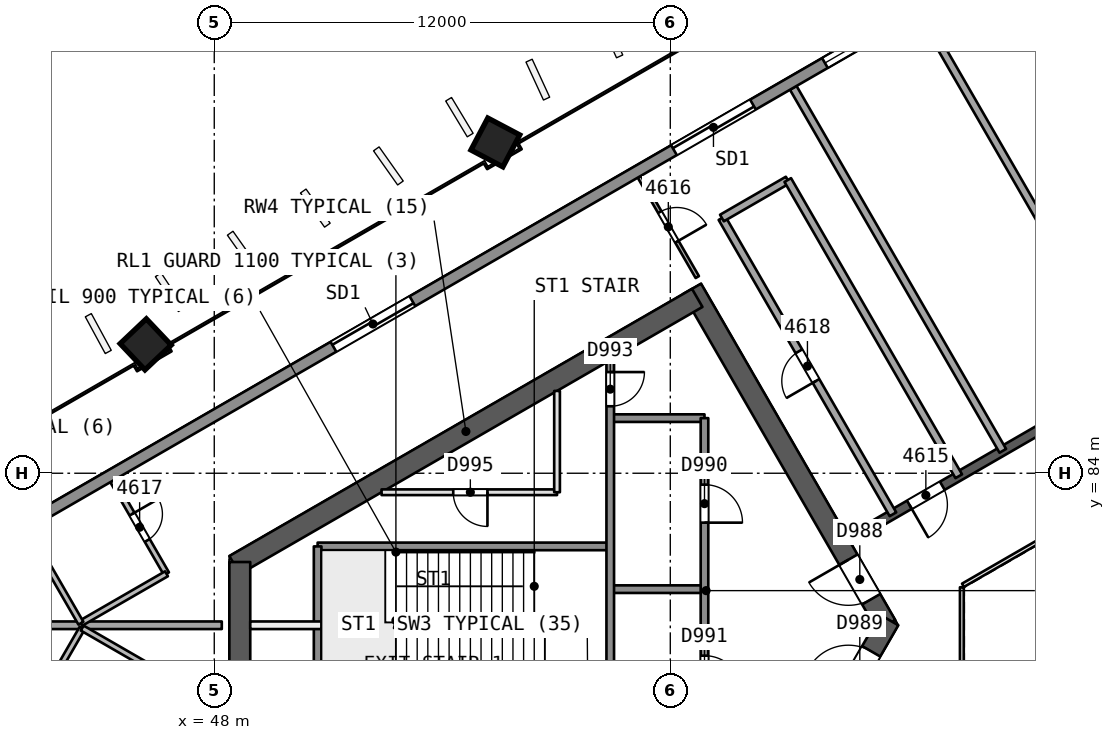
"""IFC4 building model, lengths in metres.
Left out: names, types, materials, properties, quantities, classifications, styles, units other than length and angle.
Written with IfcOpenShell. Run it as: python <this file> out.ifc"""

import sys

from ifc_helpers import new_model, si_unit, direction, frame, frame_2d, origin, origin_2d, place, context, subcontext, project, spatial, rectangle, extrude, element, fill, save


model = new_model("IFC4")
c1 = context("Model", 3, precision=1e-05, world=origin(), true_north=direction((0.0, 1.0)))
c2 = subcontext(c1, "Body", "Model", "MODEL_VIEW")
j1 = project(units=[si_unit("LENGTHUNIT", "METRE"), si_unit("PLANEANGLEUNIT", "RADIAN")], contexts=[c1])
p1 = place(None, origin())
s1 = spatial("IfcSite", under=j1, at=p1, CompositionType="ELEMENT")
p2 = place(p1, origin())
s2 = spatial("IfcBuilding", under=s1, at=p2, CompositionType="ELEMENT")
p3 = place(p2, frame((0.0, 0.0, 189.6)))
s3 = spatial("IfcBuildingStorey", under=s2, at=p3, CompositionType="ELEMENT", Elevation=189.6)
p4 = place(p3, frame((65.682, 80.0, 0.0), z_axis=(0.0, 0.0, 1.0), x_axis=(-0.500000202252, 0.866025287014, 0.0)))
e1 = element("IfcWall", 1, at=p4, inside=s3, PredefinedType="SHEAR", context=c2, shape_type="SweptSolid", body=[
    extrude(rectangle(XDim=10.221, YDim=0.55, at=frame_2d((5.111, 0.0))), origin(), (0.0, 0.0, 1.0), 3.7),
])
p5 = place(p4, frame((0.791, 0.0, 0.0)))
e2 = element("IfcOpeningElement", 2, at=p5, cuts=e1, PredefinedType="OPENING", context=c2, shape_type="SweptSolid", body=[
    extrude(rectangle(XDim=1.2, YDim=2.1, at=frame_2d((0.6, 1.05))), frame((0.0, 0.286, 0.0), z_axis=(0.0, -1.0, 0.0), x_axis=(1.0, 0.0, 0.0)), (0.0, 0.0, 1.0), 0.571),
])
p6 = place(p3, frame((60.709, 88.614, 0.0), z_axis=(0.0, 0.0, 1.0), x_axis=(-0.866020164116, -0.500009075263, 0.0)))
e3 = element("IfcWall", 3, at=p6, inside=s3, PredefinedType="SHEAR", context=c2, shape_type="SweptSolid", body=[
    extrude(rectangle(XDim=14.058, YDim=0.55, at=frame_2d((7.029, 0.0))), origin(), (0.0, 0.0, 1.0), 3.7),
])
p7 = place(p3, frame((48.672, 81.664, 0.0), z_axis=(0.0, 0.0, 1.0), x_axis=(0.0, -1.0, 0.0)))
e4 = element("IfcWall", 4, at=p7, inside=s3, PredefinedType="SHEAR", context=c2, shape_type="SweptSolid", body=[
    extrude(rectangle(XDim=3.487, YDim=0.55, at=frame_2d((1.743, 0.0))), origin(), (0.0, 0.0, 1.0), 3.7),
])
p8 = place(p3, frame((60.709, 71.386, 0.0), z_axis=(0.0, 0.0, 1.0), x_axis=(0.500015938302, 0.866016201606, 0.0)))
e5 = element("IfcWall", 5, at=p8, inside=s3, PredefinedType="SHEAR", context=c2, shape_type="SweptSolid", body=[
    extrude(rectangle(XDim=10.105, YDim=0.55, at=frame_2d((5.053, 0.0))), origin(), (0.0, 0.0, 1.0), 3.7),
])
p9 = place(p8, frame((7.955, 0.0, 0.0)))
e6 = element("IfcOpeningElement", 6, at=p9, cuts=e5, PredefinedType="OPENING", context=c2, shape_type="SweptSolid", body=[
    extrude(rectangle(XDim=1.2, YDim=2.1, at=frame_2d((0.6, 1.05))), frame((0.0, 0.286, 0.0), z_axis=(0.0, -1.0, 0.0), x_axis=(1.0, 0.0, 0.0)), (0.0, 0.0, 1.0), 0.571),
])
p10 = place(p3, frame((78.2, 90.046, 0.0), z_axis=(0.0, 0.0, 1.0), x_axis=(-0.866026492143, -0.499998114903, 0.0)))
e7 = element("IfcWall", 7, at=p10, inside=s3, PredefinedType="SHEAR", context=c2, shape_type="SweptSolid", body=[
    extrude(rectangle(XDim=15.588, YDim=0.25, at=frame_2d((7.794, 0.0))), origin(), (0.0, 0.0, 1.0), 3.25),
])
p11 = place(p10, frame((1.059, 0.0, 0.0)))
e8 = element("IfcOpeningElement", 8, at=p11, cuts=e7, PredefinedType="OPENING", context=c2, shape_type="SweptSolid", body=[
    extrude(rectangle(XDim=1.0, YDim=2.1, at=frame_2d((0.5, 1.05))), frame((0.0, 0.135, 0.0), z_axis=(0.0, -1.0, 0.0), x_axis=(1.0, 0.0, 0.0)), (0.0, 0.0, 1.0), 0.271),
])
p12 = place(p10, frame((4.616, 0.0, 0.0)))
e9 = element("IfcOpeningElement", 9, at=p12, cuts=e7, PredefinedType="OPENING", context=c2, shape_type="SweptSolid", body=[
    extrude(rectangle(XDim=0.9, YDim=2.1, at=frame_2d((0.45, 1.05))), frame((0.0, 0.135, 0.0), z_axis=(0.0, -1.0, 0.0), x_axis=(1.0, 0.0, 0.0)), (0.0, 0.0, 1.0), 0.271),
])
p13 = place(p10, frame((8.513, 0.0, 0.0)))
e10 = element("IfcOpeningElement", 10, at=p13, cuts=e7, PredefinedType="OPENING", context=c2, shape_type="SweptSolid", body=[
    extrude(rectangle(XDim=0.9, YDim=2.1, at=frame_2d((0.45, 1.05))), frame((0.0, 0.135, 0.0), z_axis=(0.0, -1.0, 0.0), x_axis=(1.0, 0.0, 0.0)), (0.0, 0.0, 1.0), 0.271),
])
p14 = place(p10, frame((12.75, 0.0, 0.0)))
e11 = element("IfcOpeningElement", 11, at=p14, cuts=e7, PredefinedType="OPENING", context=c2, shape_type="SweptSolid", body=[
    extrude(rectangle(XDim=1.0, YDim=2.1, at=frame_2d((0.5, 1.05))), frame((0.0, 0.135, 0.0), z_axis=(0.0, -1.0, 0.0), x_axis=(1.0, 0.0, 0.0)), (0.0, 0.0, 1.0), 0.271),
])
p15 = place(p3, frame((55.373, 92.719, 0.0), z_axis=(0.019328516974, -0.012138044789, 0.999739504221), x_axis=(-0.500205614953, 0.865671455024, 0.020181048691)))
e12 = element("IfcColumn", 12, at=p15, inside=s3, PredefinedType="COLUMN", context=c2, shape_type="SweptSolid", body=[
    extrude(rectangle(XDim=0.95, YDim=0.95, at=origin_2d()), origin(), (0.0, 0.0, 1.0), 3.701),
])
p16 = place(p3, frame((46.161, 87.399, 0.0), z_axis=(0.02855911485, -0.006793507689, 0.999569019734), x_axis=(-0.500407643461, 0.865554709988, 0.020180049142)))
e13 = element("IfcColumn", 13, at=p16, inside=s3, PredefinedType="COLUMN", context=c2, shape_type="SweptSolid", body=[
    extrude(rectangle(XDim=0.95, YDim=0.95, at=origin_2d()), origin(), (0.0, 0.0, 1.0), 3.702),
])
for number, where, z_axis, x_axis in (
    (14, (66.611, 96.09, 0.0), (0.0, 0.0, 1.0), (0.5, -0.866, 0.0)),
    (15, (63.236, 94.141, 0.0), (0.0, 0.0, 1.0), (0.5, -0.866, 0.0)),
):
    element("IfcWall", number, at=place(p3, frame(where, z_axis=z_axis, x_axis=x_axis)), inside=s3, PredefinedType="PARTITIONING", context=c2, shape_type="SweptSolid", body=[
        extrude(rectangle(XDim=11.029, YDim=0.2, at=frame_2d((5.514, 0.0))), origin(), (0.0, 0.0, 1.0), 3.25),
    ])
p17 = place(p3, frame((59.186, 91.803, 0.0), z_axis=(0.0, 0.0, 1.0), x_axis=(0.499978833458, -0.866037623948, 0.0)))
e16 = element("IfcWall", 16, at=p17, inside=s3, PredefinedType="PARTITIONING", context=c2, shape_type="SweptSolid", body=[
    extrude(rectangle(XDim=3.05, YDim=0.1, at=frame_2d((1.525, 0.0))), origin(), (0.0, 0.0, 1.0), 3.25),
])
p18 = place(p17, frame((1.075, 0.0, 0.0)))
e17 = element("IfcOpeningElement", 17, at=p18, cuts=e16, PredefinedType="OPENING", context=c2, shape_type="SweptSolid", body=[
    extrude(rectangle(XDim=0.9, YDim=2.1, at=frame_2d((0.45, 1.05))), frame((0.0, 0.061, 0.0), z_axis=(0.0, -1.0, 0.0), x_axis=(1.0, 0.0, 0.0)), (0.0, 0.0, 1.0), 0.121),
])
p19 = place(p3, frame((65.859, 82.921, 0.0), z_axis=(0.0, 0.0, 1.0), x_axis=(-0.5000018851, 0.866024315419, 0.0)))
e18 = element("IfcWall", 18, at=p19, inside=s3, PredefinedType="PARTITIONING", context=c2, shape_type="SweptSolid", body=[
    extrude(rectangle(XDim=9.0, YDim=0.2, at=frame_2d((4.5, 0.0))), origin(), (0.0, 0.0, 1.0), 3.25),
])
p20 = place(p19, frame((4.05, 0.0, 0.0)))
e19 = element("IfcOpeningElement", 19, at=p20, cuts=e18, PredefinedType="OPENING", context=c2, shape_type="SweptSolid", body=[
    extrude(rectangle(XDim=0.9, YDim=2.1, at=frame_2d((0.45, 1.05))), frame((0.0, 0.11, 0.0), z_axis=(0.0, -1.0, 0.0), x_axis=(1.0, 0.0, 0.0)), (0.0, 0.0, 1.0), 0.221),
])
p21 = place(p3, frame((61.359, 90.715, 0.0), z_axis=(0.0, 0.0, 1.0), x_axis=(0.866041268327, 0.499972520799, 0.0)))
e20 = element("IfcWall", 20, at=p21, inside=s3, PredefinedType="PARTITIONING", context=c2, shape_type="SweptSolid", body=[
    extrude(rectangle(XDim=2.0, YDim=0.2, at=frame_2d((1.0, 0.0))), origin(), (0.0, 0.0, 1.0), 3.25),
])
p22 = place(p3, frame((63.091, 91.715, 0.0), z_axis=(0.0, 0.0, 1.0), x_axis=(0.5000018851, -0.866024315419, 0.0)))
e21 = element("IfcWall", 21, at=p22, inside=s3, PredefinedType="PARTITIONING", context=c2, shape_type="SweptSolid", body=[
    extrude(rectangle(XDim=9.0, YDim=0.2, at=frame_2d((4.5, 0.0))), origin(), (0.0, 0.0, 1.0), 3.25),
])
p23 = place(p3, frame((45.329, 83.803, 0.0), z_axis=(0.0, 0.0, 1.0), x_axis=(0.500048839472, -0.865997204466, 0.0)))
e22 = element("IfcWall", 22, at=p23, inside=s3, PredefinedType="PARTITIONING", context=c2, shape_type="SweptSolid", body=[
    extrude(rectangle(XDim=2.827, YDim=0.15, at=frame_2d((1.414, 0.0))), origin(), (0.0, 0.0, 1.0), 3.25),
])
p24 = place(p23, frame((1.014, 0.0, 0.0)))
e23 = element("IfcOpeningElement", 23, at=p24, cuts=e22, PredefinedType="OPENING", context=c2, shape_type="SweptSolid", body=[
    extrude(rectangle(XDim=0.8, YDim=2.1, at=frame_2d((0.4, 1.05))), frame((0.0, 0.085, 0.0), z_axis=(0.0, -1.0, 0.0), x_axis=(1.0, 0.0, 0.0)), (0.0, 0.0, 1.0), 0.171),
])
p25 = place(p3, frame((46.743, 81.354, 0.0), z_axis=(0.0, 0.0, 1.0), x_axis=(-0.866021400173, -0.500006934395, 0.0)))
e24 = element("IfcWall", 24, at=p25, inside=s3, PredefinedType="PARTITIONING", context=c2, shape_type="SweptSolid", body=[
    extrude(rectangle(XDim=2.6, YDim=0.15, at=frame_2d((1.3, 0.0))), origin(), (0.0, 0.0, 1.0), 3.25),
])
p26 = place(p3, frame((44.491, 80.054, 0.0), z_axis=(0.0, 0.0, 1.0), x_axis=(-0.500043204492, 0.866000458222, 0.0)))
e25 = element("IfcWall", 25, at=p26, inside=s3, PredefinedType="PARTITIONING", context=c2, shape_type="SweptSolid", body=[
    extrude(rectangle(XDim=2.482, YDim=0.15, at=frame_2d((1.241, 0.0))), origin(), (0.0, 0.0, 1.0), 3.25),
])
p27 = place(p3, frame((43.25, 80.0, 0.0), z_axis=(0.0, 0.0, 1.0), x_axis=(1.0, 0.0, 0.0)))
e26 = element("IfcWall", 26, at=p27, inside=s3, PredefinedType="PARTITIONING", context=c2, shape_type="SweptSolid", body=[
    extrude(rectangle(XDim=4.948, YDim=0.2, at=frame_2d((2.474, 0.0))), origin(), (0.0, 0.0, 1.0), 3.25),
])
p28 = place(p3, frame((43.25, 77.718, 0.0), z_axis=(0.0, 0.0, 1.0), x_axis=(0.499990435942, 0.866030925526, 0.0)))
e27 = element("IfcWall", 27, at=p28, inside=s3, PredefinedType="PARTITIONING", context=c2, shape_type="SweptSolid", body=[
    extrude(rectangle(XDim=2.55, YDim=0.15, at=frame_2d((1.275, 0.0))), origin(), (0.0, 0.0, 1.0), 3.25),
])
p29 = place(p3, frame((44.525, 79.926, 0.0), z_axis=(0.0, 0.0, 1.0), x_axis=(0.866021400173, -0.500006934395, 0.0)))
e28 = element("IfcWall", 28, at=p29, inside=s3, PredefinedType="PARTITIONING", context=c2, shape_type="SweptSolid", body=[
    extrude(rectangle(XDim=2.6, YDim=0.15, at=frame_2d((1.3, 0.0))), origin(), (0.0, 0.0, 1.0), 3.25),
])
p30 = place(p3, frame((43.101, 82.689, 0.0), z_axis=(0.0, 0.0, 1.0), x_axis=(0.866025007541, 0.500000686313, 0.0)))
e29 = element("IfcWall", 29, at=p30, inside=s3, PredefinedType="SOLIDWALL", context=c2, shape_type="SweptSolid", body=[
    extrude(rectangle(XDim=52.562, YDim=0.3, at=frame_2d((26.281, 0.0))), origin(), (0.0, 0.0, 1.0), 3.25),
])
p31 = place(p30, frame((31.316, 0.0, 0.0)))
e30 = element("IfcOpeningElement", 30, at=p31, cuts=e29, PredefinedType="OPENING", context=c2, shape_type="SweptSolid", body=[
    extrude(rectangle(XDim=2.4, YDim=2.4, at=frame_2d((1.2, 1.2))), frame((0.0, 0.161, 0.0), z_axis=(0.0, -1.0, 0.0), x_axis=(1.0, 0.0, 0.0)), (0.0, 0.0, 1.0), 0.321),
])
p32 = place(p30, frame((40.864, 0.0, 0.0)))
e31 = element("IfcOpeningElement", 31, at=p32, cuts=e29, PredefinedType="OPENING", context=c2, shape_type="SweptSolid", body=[
    extrude(rectangle(XDim=2.4, YDim=2.4, at=frame_2d((1.2, 1.2))), frame((0.0, 0.161, 0.0), z_axis=(0.0, -1.0, 0.0), x_axis=(1.0, 0.0, 0.0)), (0.0, 0.0, 1.0), 0.321),
])
p33 = place(p30, frame((19.625, 0.0, 0.0)))
e32 = element("IfcOpeningElement", 32, at=p33, cuts=e29, PredefinedType="OPENING", context=c2, shape_type="SweptSolid", body=[
    extrude(rectangle(XDim=2.4, YDim=2.4, at=frame_2d((1.2, 1.2))), frame((0.0, 0.161, 0.0), z_axis=(0.0, -1.0, 0.0), x_axis=(1.0, 0.0, 0.0)), (0.0, 0.0, 1.0), 0.321),
])
p34 = place(p30, frame((9.277, 0.0, 0.0)))
e33 = element("IfcOpeningElement", 33, at=p34, cuts=e29, PredefinedType="OPENING", context=c2, shape_type="SweptSolid", body=[
    extrude(rectangle(XDim=2.4, YDim=2.4, at=frame_2d((1.2, 1.2))), frame((0.0, 0.161, 0.0), z_axis=(0.0, -1.0, 0.0), x_axis=(1.0, 0.0, 0.0)), (0.0, 0.0, 1.0), 0.321),
])
p35 = place(p30, frame((28.109, 0.0, 0.9)))
e34 = element("IfcOpeningElement", 34, at=p35, cuts=e29, PredefinedType="OPENING", context=c2, shape_type="SweptSolid", body=[
    extrude(rectangle(XDim=1.8, YDim=1.5, at=frame_2d((0.9, 0.75))), frame((0.0, 0.161, 0.0), z_axis=(0.0, -1.0, 0.0), x_axis=(1.0, 0.0, 0.0)), (0.0, 0.0, 1.0), 0.321),
])
p36 = place(p30, frame((24.212, 0.0, 0.9)))
e35 = element("IfcOpeningElement", 35, at=p36, cuts=e29, PredefinedType="OPENING", context=c2, shape_type="SweptSolid", body=[
    extrude(rectangle(XDim=1.8, YDim=1.5, at=frame_2d((0.9, 0.75))), frame((0.0, 0.161, 0.0), z_axis=(0.0, -1.0, 0.0), x_axis=(1.0, 0.0, 0.0)), (0.0, 0.0, 1.0), 0.321),
])
p37 = place(p3, frame((60.9, 85.45, 0.0), z_axis=(0.0, 0.0, 1.0), x_axis=(-1.0, 0.0, 0.0)))
e36 = element("IfcWall", 36, at=p37, inside=s3, PredefinedType="SOLIDWALL", context=c2, shape_type="SweptSolid", body=[
    extrude(rectangle(XDim=2.48, YDim=0.2, at=frame_2d((1.24, 0.0))), origin(), (0.0, 0.0, 1.0), 3.25),
])
p38 = place(p3, frame((57.02, 83.5, 0.0), z_axis=(0.0, 0.0, 1.0), x_axis=(-1.0, 0.0, 0.0)))
e37 = element("IfcWall", 37, at=p38, inside=s3, PredefinedType="PARTITIONING", context=c2, shape_type="SweptSolid", body=[
    extrude(rectangle(XDim=4.618, YDim=0.15, at=frame_2d((2.309, 0.0))), origin(), (0.0, 0.0, 1.0), 3.25),
])
p39 = place(p38, frame((1.832, 0.0, 0.0)))
e38 = element("IfcOpeningElement", 38, at=p39, cuts=e37, PredefinedType="OPENING", context=c2, shape_type="SweptSolid", body=[
    extrude(rectangle(XDim=0.9, YDim=2.1, at=frame_2d((0.45, 1.05))), frame((0.0, 0.085, 0.0), z_axis=(0.0, -1.0, 0.0), x_axis=(1.0, 0.0, 0.0)), (0.0, 0.0, 1.0), 0.171),
])
p40 = place(p3, frame((58.42, 82.075, 0.0), z_axis=(0.0, 0.0, 1.0), x_axis=(-1.0, 0.0, 0.0)))
e39 = element("IfcWall", 39, at=p40, inside=s3, PredefinedType="SOLIDWALL", context=c2, shape_type="SweptSolid", body=[
    extrude(rectangle(XDim=7.7, YDim=0.2, at=frame_2d((3.85, 0.0))), origin(), (0.0, 0.0, 1.0), 3.25),
])
p41 = place(p3, frame((60.9, 80.95, 0.0), z_axis=(0.0, 0.0, 1.0), x_axis=(-1.0, 0.0, 0.0)))
e40 = element("IfcWall", 40, at=p41, inside=s3, PredefinedType="SOLIDWALL", context=c2, shape_type="SweptSolid", body=[
    extrude(rectangle(XDim=2.48, YDim=0.2, at=frame_2d((1.24, 0.0))), origin(), (0.0, 0.0, 1.0), 3.25),
])
p42 = place(p3, frame((50.82, 80.0, 0.0), z_axis=(0.0, 0.0, 1.0), x_axis=(-1.0, 0.0, 0.0)))
e41 = element("IfcWall", 41, at=p42, inside=s3, PredefinedType="PARTITIONING", context=c2, shape_type="SweptSolid", body=[
    extrude(rectangle(XDim=1.873, YDim=0.2, at=frame_2d((0.937, 0.0))), origin(), (0.0, 0.0, 1.0), 3.25),
])
p43 = place(p3, frame((60.9, 85.45, 0.0), z_axis=(0.0, 0.0, 1.0), x_axis=(0.0, -1.0, 0.0)))
e42 = element("IfcWall", 42, at=p43, inside=s3, PredefinedType="SOLIDWALL", context=c2, shape_type="SweptSolid", body=[
    extrude(rectangle(XDim=10.9, YDim=0.2, at=frame_2d((5.45, 0.0))), origin(), (0.0, 0.0, 1.0), 3.25),
])
p44 = place(p43, frame((1.75, 0.0, 0.0)))
e43 = element("IfcOpeningElement", 43, at=p44, cuts=e42, PredefinedType="OPENING", context=c2, shape_type="SweptSolid", body=[
    extrude(rectangle(XDim=1.0, YDim=2.1, at=frame_2d((0.5, 1.05))), frame((0.0, 0.11, 0.0), z_axis=(0.0, -1.0, 0.0), x_axis=(1.0, 0.0, 0.0)), (0.0, 0.0, 1.0), 0.221),
])
p45 = place(p43, frame((6.25, 0.0, 0.0)))
e44 = element("IfcOpeningElement", 44, at=p45, cuts=e42, PredefinedType="OPENING", context=c2, shape_type="SweptSolid", body=[
    extrude(rectangle(XDim=1.0, YDim=2.1, at=frame_2d((0.5, 1.05))), frame((0.0, 0.11, 0.0), z_axis=(0.0, -1.0, 0.0), x_axis=(1.0, 0.0, 0.0)), (0.0, 0.0, 1.0), 0.221),
])
p46 = place(p3, frame((58.42, 86.974, 0.0), z_axis=(0.0, 0.0, 1.0), x_axis=(0.0, -1.0, 0.0)))
e45 = element("IfcWall", 45, at=p46, inside=s3, PredefinedType="SOLIDWALL", context=c2, shape_type="SweptSolid", body=[
    extrude(rectangle(XDim=10.524, YDim=0.2, at=frame_2d((5.262, 0.0))), origin(), (0.0, 0.0, 1.0), 3.25),
])
p47 = place(p46, frame((0.312, 0.0, 0.0)))
e46 = element("IfcOpeningElement", 46, at=p47, cuts=e45, PredefinedType="OPENING", context=c2, shape_type="SweptSolid", body=[
    extrude(rectangle(XDim=0.9, YDim=2.1, at=frame_2d((0.45, 1.05))), frame((0.0, 0.11, 0.0), z_axis=(0.0, -1.0, 0.0), x_axis=(1.0, 0.0, 0.0)), (0.0, 0.0, 1.0), 0.221),
])
p48 = place(p3, frame((57.02, 86.166, 0.0), z_axis=(0.0, 0.0, 1.0), x_axis=(0.0, -1.0, 0.0)))
e47 = element("IfcWall", 47, at=p48, inside=s3, PredefinedType="PARTITIONING", context=c2, shape_type="SweptSolid", body=[
    extrude(rectangle(XDim=2.666, YDim=0.15, at=frame_2d((1.333, 0.0))), origin(), (0.0, 0.0, 1.0), 3.25),
])
p49 = place(p3, frame((50.72, 82.075, 0.0), z_axis=(0.0, 0.0, 1.0), x_axis=(0.0, -1.0, 0.0)))
e48 = element("IfcWall", 48, at=p49, inside=s3, PredefinedType="SOLIDWALL", context=c2, shape_type="SweptSolid", body=[
    extrude(rectangle(XDim=4.15, YDim=0.2, at=frame_2d((2.075, 0.0))), origin(), (0.0, 0.0, 1.0), 3.25),
])
p50 = place(p3, frame((77.738, 86.846, 0.0), z_axis=(0.0, 0.0, 1.0), x_axis=(-0.866026658274, -0.499997827154, 0.0)))
e49 = element("IfcWall", 49, at=p50, inside=s3, PredefinedType="PARTITIONING", context=c2, shape_type="SweptSolid", body=[
    extrude(rectangle(XDim=11.588, YDim=0.1, at=frame_2d((5.794, 0.0))), origin(), (0.0, 0.0, 1.0), 3.25),
])
p51 = place(p3, frame((67.672, 81.0, 0.0), z_axis=(0.0, 0.0, 1.0), x_axis=(0.0, -1.0, 0.0)))
e50 = element("IfcWall", 50, at=p51, inside=s3, PredefinedType="PARTITIONING", context=c2, shape_type="SweptSolid", body=[
    extrude(rectangle(XDim=2.0, YDim=0.1, at=frame_2d((1.0, 0.0))), origin(), (0.0, 0.0, 1.0), 3.25),
])
p52 = place(p14, origin())
e51 = element("IfcDoor", 51, at=p52, inside=s3, OperationType="SINGLE_SWING_RIGHT", PredefinedType="NOTDEFINED", context=c2, shape_type="SweptSolid", body=[
    extrude(rectangle(XDim=1.0, YDim=2.1, at=frame_2d((0.5, 1.05))), frame((0.0, 0.025, 0.0), z_axis=(0.0, -1.0, 0.0), x_axis=(1.0, 0.0, 0.0)), (0.0, 0.0, 1.0), 0.05),
])
fill(e11, e51)
p53 = place(p18, origin())
e52 = element("IfcDoor", 52, at=p53, inside=s3, OperationType="SINGLE_SWING_RIGHT", PredefinedType="NOTDEFINED", context=c2, shape_type="SweptSolid", body=[
    extrude(rectangle(XDim=0.9, YDim=2.1, at=frame_2d((0.45, 1.05))), frame((0.0, 0.025, 0.0), z_axis=(0.0, -1.0, 0.0), x_axis=(1.0, 0.0, 0.0)), (0.0, 0.0, 1.0), 0.05),
])
fill(e17, e52)
p54 = place(p24, origin())
e53 = element("IfcDoor", 53, at=p54, inside=s3, OperationType="SINGLE_SWING_LEFT", PredefinedType="NOTDEFINED", context=c2, shape_type="SweptSolid", body=[
    extrude(rectangle(XDim=0.8, YDim=2.1, at=frame_2d((0.4, 1.05))), frame((0.0, 0.025, 0.0), z_axis=(0.0, -1.0, 0.0), x_axis=(1.0, 0.0, 0.0)), (0.0, 0.0, 1.0), 0.05),
])
fill(e23, e53)
p55 = place(p20, origin())
e54 = element("IfcDoor", 54, at=p55, inside=s3, OperationType="SINGLE_SWING_LEFT", PredefinedType="NOTDEFINED", context=c2, shape_type="SweptSolid", body=[
    extrude(rectangle(XDim=0.9, YDim=2.1, at=frame_2d((0.45, 1.05))), frame((0.0, 0.025, 0.0), z_axis=(0.0, -1.0, 0.0), x_axis=(1.0, 0.0, 0.0)), (0.0, 0.0, 1.0), 0.05),
])
fill(e19, e54)
p56 = place(p33, origin())
e55 = element("IfcDoor", 55, at=p56, inside=s3, OperationType="SLIDING_TO_LEFT", PredefinedType="NOTDEFINED", context=c2, shape_type="SweptSolid", body=[
    extrude(rectangle(XDim=2.4, YDim=2.4, at=frame_2d((1.2, 1.2))), frame((0.0, 0.025, 0.0), z_axis=(0.0, -1.0, 0.0), x_axis=(1.0, 0.0, 0.0)), (0.0, 0.0, 1.0), 0.05),
])
fill(e32, e55)
p57 = place(p34, origin())
e56 = element("IfcDoor", 56, at=p57, inside=s3, OperationType="SLIDING_TO_RIGHT", PredefinedType="NOTDEFINED", context=c2, shape_type="SweptSolid", body=[
    extrude(rectangle(XDim=2.4, YDim=2.4, at=frame_2d((1.2, 1.2))), frame((0.0, 0.025, 0.0), z_axis=(0.0, -1.0, 0.0), x_axis=(1.0, 0.0, 0.0)), (0.0, 0.0, 1.0), 0.05),
])
fill(e33, e56)
p58 = place(p36, origin())
e57 = element("IfcWindow", 57, at=p58, inside=s3, PartitioningType="SINGLE_PANEL", PredefinedType="WINDOW", context=c2, shape_type="SweptSolid", body=[
    extrude(rectangle(XDim=1.8, YDim=1.5, at=frame_2d((0.9, 0.75))), frame((0.0, 0.03, 0.0), z_axis=(0.0, -1.0, 0.0), x_axis=(1.0, 0.0, 0.0)), (0.0, 0.0, 1.0), 0.06),
])
fill(e35, e57)
p59 = place(p5, origin())
e58 = element("IfcDoor", 58, at=p59, inside=s3, OperationType="SINGLE_SWING_RIGHT", PredefinedType="NOTDEFINED", context=c2, shape_type="SweptSolid", body=[
    extrude(rectangle(XDim=1.2, YDim=2.1, at=frame_2d((0.6, 1.05))), frame((0.0, 0.025, 0.0), z_axis=(0.0, -1.0, 0.0), x_axis=(1.0, 0.0, 0.0)), (0.0, 0.0, 1.0), 0.05),
])
fill(e2, e58)
p60 = place(p9, origin())
e59 = element("IfcDoor", 59, at=p60, inside=s3, OperationType="SINGLE_SWING_LEFT", PredefinedType="NOTDEFINED", context=c2, shape_type="SweptSolid", body=[
    extrude(rectangle(XDim=1.2, YDim=2.1, at=frame_2d((0.6, 1.05))), frame((0.0, 0.025, 0.0), z_axis=(0.0, -1.0, 0.0), x_axis=(1.0, 0.0, 0.0)), (0.0, 0.0, 1.0), 0.05),
])
fill(e6, e59)
p61 = place(p44, origin())
e60 = element("IfcDoor", 60, at=p61, inside=s3, OperationType="SINGLE_SWING_RIGHT", PredefinedType="NOTDEFINED", context=c2, shape_type="SweptSolid", body=[
    extrude(rectangle(XDim=1.0, YDim=2.1, at=frame_2d((0.5, 1.05))), frame((0.0, 0.025, 0.0), z_axis=(0.0, -1.0, 0.0), x_axis=(1.0, 0.0, 0.0)), (0.0, 0.0, 1.0), 0.05),
])
fill(e43, e60)
p62 = place(p45, origin())
e61 = element("IfcDoor", 61, at=p62, inside=s3, OperationType="SINGLE_SWING_RIGHT", PredefinedType="NOTDEFINED", context=c2, shape_type="SweptSolid", body=[
    extrude(rectangle(XDim=1.0, YDim=2.1, at=frame_2d((0.5, 1.05))), frame((0.0, 0.025, 0.0), z_axis=(0.0, -1.0, 0.0), x_axis=(1.0, 0.0, 0.0)), (0.0, 0.0, 1.0), 0.05),
])
fill(e44, e61)
p63 = place(p47, origin())
e62 = element("IfcDoor", 62, at=p63, inside=s3, OperationType="SINGLE_SWING_LEFT", PredefinedType="NOTDEFINED", context=c2, shape_type="SweptSolid", body=[
    extrude(rectangle(XDim=0.9, YDim=2.1, at=frame_2d((0.45, 1.05))), frame((0.0, 0.025, 0.0), z_axis=(0.0, -1.0, 0.0), x_axis=(1.0, 0.0, 0.0)), (0.0, 0.0, 1.0), 0.05),
])
fill(e46, e62)
p64 = place(p39, origin())
e63 = element("IfcDoor", 63, at=p64, inside=s3, OperationType="SINGLE_SWING_LEFT", PredefinedType="NOTDEFINED", context=c2, shape_type="SweptSolid", body=[
    extrude(rectangle(XDim=0.9, YDim=2.1, at=frame_2d((0.45, 1.05))), frame((0.0, 0.025, 0.0), z_axis=(0.0, -1.0, 0.0), x_axis=(1.0, 0.0, 0.0)), (0.0, 0.0, 1.0), 0.05),
])
fill(e38, e63)
save(model, sys.argv[1])
